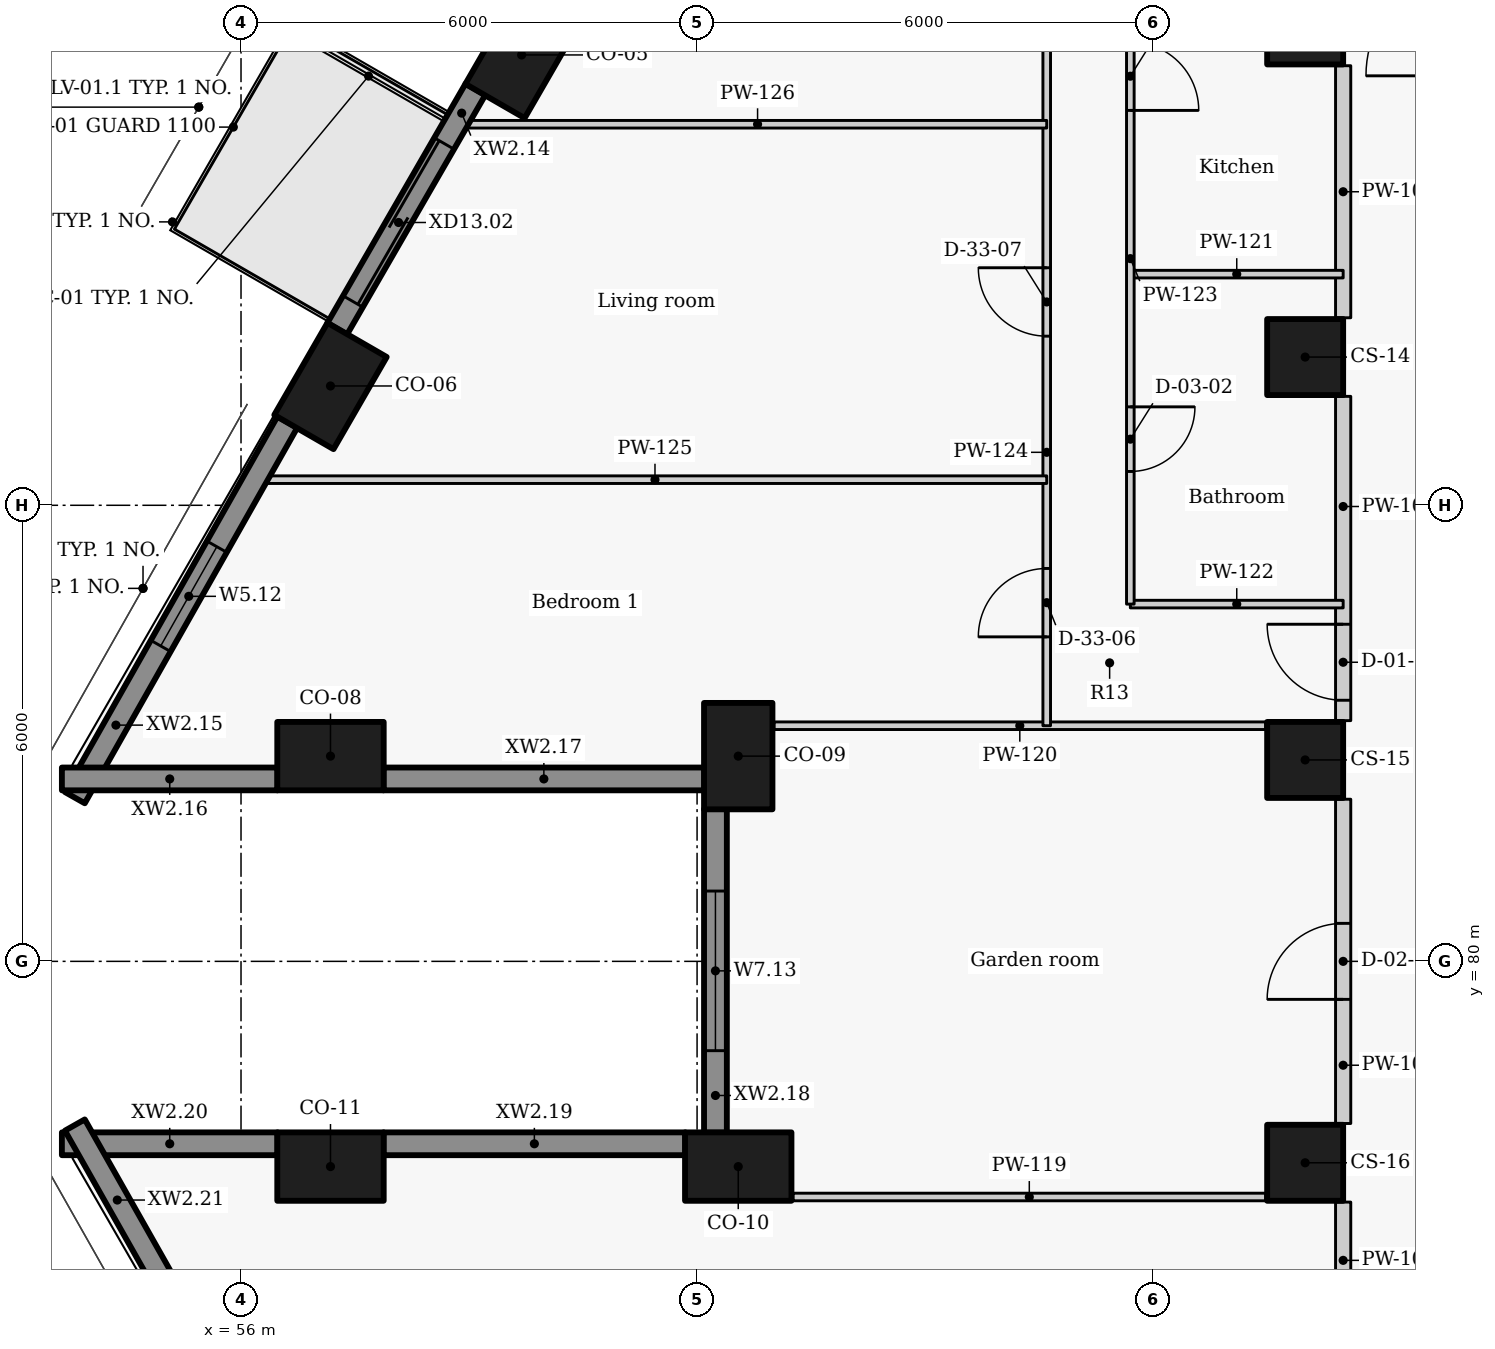
"""IFC4 building model, lengths in metres.
Left out: names, types, materials, properties, quantities, classifications, styles, units other than length and angle.
Written with IfcOpenShell. Run it as: python <this file> out.ifc"""

import sys

from ifc_helpers import new_model, si_unit, direction, frame, frame_2d, origin, origin_2d, place, context, subcontext, project, spatial, rectangle, extrude, element, fill, save


model = new_model("IFC4")
c1 = context("Model", 3, precision=1e-05, world=origin(), true_north=direction((0.0, 1.0)))
c2 = subcontext(c1, "Body", "Model", "MODEL_VIEW")
j1 = project(units=[si_unit("LENGTHUNIT", "METRE"), si_unit("PLANEANGLEUNIT", "RADIAN")], contexts=[c1])
p1 = place(None, origin())
s1 = spatial("IfcSite", under=j1, at=p1, CompositionType="ELEMENT")
p2 = place(p1, origin())
s2 = spatial("IfcBuilding", under=s1, at=p2, CompositionType="ELEMENT")
p3 = place(p2, frame((0.0, 0.0, 117.3)))
s3 = spatial("IfcBuildingStorey", under=s2, at=p3, CompositionType="ELEMENT", Elevation=117.3)
for number, where, z_axis, x_axis in (
    (1, (59.692, 91.925, 0.0), (0.0, 0.0, 1.0), (-0.5, -0.866, 0.0)),
    (2, (57.177, 87.57, 0.0), (0.0, 0.0, 1.0), (-0.5, -0.866, 0.0)),
    (3, (57.177, 82.7, 0.0), (0.0, 0.0, 1.0), (1.0, 0.0, 0.0)),
    (4, (62.542, 82.7, 0.0), (0.0, 0.0, 1.0), (0.0, -1.0, 0.0)),
    (5, (62.542, 77.3, 0.0), (0.0, 0.0, 1.0), (-1.0, 0.0, 0.0)),
    (6, (57.177, 77.3, 0.0), (0.0, 0.0, 1.0), (-1.0, 0.0, 0.0)),
):
    element("IfcColumn", number, at=place(p3, frame(where, z_axis=z_axis, x_axis=x_axis)), inside=s3, PredefinedType="COLUMN", context=c2, shape_type="SweptSolid", body=[
        extrude(rectangle(XDim=1.4, YDim=0.9, at=origin_2d()), origin(), (0.0, 0.0, 1.0), 3.3),
    ])
for number, where, z_axis, x_axis in (
    (7, (70.0, 92.3, 0.0), (0.0, 0.0, 1.0), (0.0, -1.0, 0.0)),
    (8, (70.0, 87.95, 0.0), (0.0, 0.0, 1.0), (0.0, -1.0, 0.0)),
    (9, (70.0, 82.65, 0.0), (0.0, 0.0, 1.0), (0.0, -1.0, 0.0)),
    (10, (70.0, 77.35, 0.0), (0.0, 0.0, 1.0), (0.0, -1.0, 0.0)),
):
    element("IfcColumn", number, at=place(p3, frame(where, z_axis=z_axis, x_axis=x_axis)), inside=s3, PredefinedType="COLUMN", context=c2, shape_type="SweptSolid", body=[
        extrude(rectangle(XDim=1.0, YDim=1.0, at=origin_2d()), origin(), (0.0, 0.0, 1.0), 3.3),
    ])
p4 = place(p3, frame((59.084, 91.472, 0.0), z_axis=(0.0, 0.0, 1.0), x_axis=(-0.500009139881, -0.866020126807, 0.0)))
e11 = element("IfcWall", 11, at=p4, inside=s3, PredefinedType="SOLIDWALL", context=c2, shape_type="SweptSolid", body=[
    extrude(rectangle(XDim=3.637, YDim=0.3, at=frame_2d((1.818, 0.0))), origin(), (0.0, 0.0, 1.0), 2.05),
])
p5 = place(p4, frame((0.823, 0.0, 0.0)))
e12 = element("IfcOpeningElement", 12, at=p5, cuts=e11, PredefinedType="OPENING", context=c2, shape_type="SweptSolid", body=[
    extrude(rectangle(XDim=2.4, YDim=2.0, at=frame_2d((1.2, 1.0))), frame((0.0, 0.16, 0.0), z_axis=(0.0, -1.0, 0.0), x_axis=(1.0, 0.0, 0.0)), (0.0, 0.0, 1.0), 0.32),
])
p6 = place(p3, frame((56.609, 87.094, 0.0), z_axis=(0.0, 0.0, 1.0), x_axis=(-0.492456858874, -0.870336855561, 0.0)))
e13 = element("IfcWall", 13, at=p6, inside=s3, PredefinedType="SOLIDWALL", context=c2, shape_type="SweptSolid", body=[
    extrude(rectangle(XDim=5.677, YDim=0.3, at=frame_2d((2.838, 0.0))), origin(), (0.0, 0.0, 1.0), 2.05),
])
p7 = place(p6, frame((1.883, 0.0, 0.9)))
e14 = element("IfcOpeningElement", 14, at=p7, cuts=e13, PredefinedType="OPENING", context=c2, shape_type="SweptSolid", body=[
    extrude(rectangle(XDim=1.5, YDim=1.1, at=frame_2d((0.75, 0.55))), frame((0.0, 0.16, 0.0), z_axis=(0.0, -1.0, 0.0), x_axis=(1.0, 0.0, 0.0)), (0.0, 0.0, 1.0), 0.32),
])
p8 = place(p3, frame((53.643, 82.4, 0.0), z_axis=(0.0, 0.0, 1.0), x_axis=(1.0, 0.0, 0.0)))
e15 = element("IfcWall", 15, at=p8, inside=s3, PredefinedType="SOLIDWALL", context=c2, shape_type="SweptSolid", body=[
    extrude(rectangle(XDim=2.838, YDim=0.3, at=frame_2d((1.419, 0.0))), origin(), (0.0, 0.0, 1.0), 2.05),
])
p9 = place(p3, frame((57.873, 82.4, 0.0), z_axis=(0.0, 0.0, 1.0), x_axis=(1.0, 0.0, 0.0)))
e16 = element("IfcWall", 16, at=p9, inside=s3, PredefinedType="SOLIDWALL", context=c2, shape_type="SweptSolid", body=[
    extrude(rectangle(XDim=4.223, YDim=0.3, at=frame_2d((2.111, 0.0))), origin(), (0.0, 0.0, 1.0), 2.05),
])
p10 = place(p3, frame((62.242, 82.004, 0.0), z_axis=(0.0, 0.0, 1.0), x_axis=(0.0, -1.0, 0.0)))
e17 = element("IfcWall", 17, at=p10, inside=s3, PredefinedType="SOLIDWALL", context=c2, shape_type="SweptSolid", body=[
    extrude(rectangle(XDim=4.258, YDim=0.3, at=frame_2d((2.129, 0.0))), origin(), (0.0, 0.0, 1.0), 2.05),
])
p11 = place(p10, frame((1.079, 0.0, 0.9)))
e18 = element("IfcOpeningElement", 18, at=p11, cuts=e17, PredefinedType="OPENING", context=c2, shape_type="SweptSolid", body=[
    extrude(rectangle(XDim=2.1, YDim=1.1, at=frame_2d((1.05, 0.55))), frame((0.0, 0.16, 0.0), z_axis=(0.0, -1.0, 0.0), x_axis=(1.0, 0.0, 0.0)), (0.0, 0.0, 1.0), 0.32),
])
p12 = place(p3, frame((61.846, 77.6, 0.0), z_axis=(0.0, 0.0, 1.0), x_axis=(-1.0, 0.0, 0.0)))
e19 = element("IfcWall", 19, at=p12, inside=s3, PredefinedType="SOLIDWALL", context=c2, shape_type="SweptSolid", body=[
    extrude(rectangle(XDim=3.973, YDim=0.3, at=frame_2d((1.986, 0.0))), origin(), (0.0, 0.0, 1.0), 2.05),
])
p13 = place(p3, frame((56.481, 77.6, 0.0), z_axis=(0.0, 0.0, 1.0), x_axis=(-1.0, 0.0, 0.0)))
e20 = element("IfcWall", 20, at=p13, inside=s3, PredefinedType="SOLIDWALL", context=c2, shape_type="SweptSolid", body=[
    extrude(rectangle(XDim=2.838, YDim=0.3, at=frame_2d((1.419, 0.0))), origin(), (0.0, 0.0, 1.0), 2.05),
])
p14 = place(p3, frame((53.814, 77.847, 0.0), z_axis=(0.0, 0.0, 1.0), x_axis=(0.492456858874, -0.870336855561, 0.0)))
e21 = element("IfcWall", 21, at=p14, inside=s3, PredefinedType="SOLIDWALL", context=c2, shape_type="SweptSolid", body=[
    extrude(rectangle(XDim=5.677, YDim=0.3, at=frame_2d((2.838, 0.0))), origin(), (0.0, 0.0, 1.0), 2.05),
])
p15 = place(p14, frame((2.367, 0.0, 0.9)))
e22 = element("IfcOpeningElement", 22, at=p15, cuts=e21, PredefinedType="OPENING", context=c2, shape_type="SweptSolid", body=[
    extrude(rectangle(XDim=2.1, YDim=1.1, at=frame_2d((1.05, 0.55))), frame((0.0, 0.16, 0.0), z_axis=(0.0, -1.0, 0.0), x_axis=(1.0, 0.0, 0.0)), (0.0, 0.0, 1.0), 0.32),
])
p16 = place(p3, frame((70.5, 72.567, 0.0), z_axis=(0.0, 0.0, 1.0), x_axis=(0.0, 1.0, 0.0)))
e23 = element("IfcWall", 23, at=p16, inside=s3, PredefinedType="PARTITIONING", context=c2, shape_type="SweptSolid", body=[
    extrude(rectangle(XDim=4.266, YDim=0.2, at=frame_2d((2.133, 0.0))), origin(), (0.0, 0.0, 1.0), 2.95),
])
p17 = place(p16, frame((1.633, 0.0, 0.0)))
e24 = element("IfcOpeningElement", 24, at=p17, cuts=e23, PredefinedType="OPENING", context=c2, shape_type="SweptSolid", body=[
    extrude(rectangle(XDim=1.0, YDim=2.1, at=frame_2d((0.5, 1.05))), frame((0.0, 0.11, 0.0), z_axis=(0.0, -1.0, 0.0), x_axis=(1.0, 0.0, 0.0)), (0.0, 0.0, 1.0), 0.22),
])
p18 = place(p3, frame((70.5, 77.867, 0.0), z_axis=(0.0, 0.0, 1.0), x_axis=(0.0, 1.0, 0.0)))
e25 = element("IfcWall", 25, at=p18, inside=s3, PredefinedType="PARTITIONING", context=c2, shape_type="SweptSolid", body=[
    extrude(rectangle(XDim=4.266, YDim=0.2, at=frame_2d((2.133, 0.0))), origin(), (0.0, 0.0, 1.0), 2.95),
])
p19 = place(p18, frame((1.633, 0.0, 0.0)))
e26 = element("IfcOpeningElement", 26, at=p19, cuts=e25, PredefinedType="OPENING", context=c2, shape_type="SweptSolid", body=[
    extrude(rectangle(XDim=1.0, YDim=2.1, at=frame_2d((0.5, 1.05))), frame((0.0, 0.11, 0.0), z_axis=(0.0, -1.0, 0.0), x_axis=(1.0, 0.0, 0.0)), (0.0, 0.0, 1.0), 0.22),
])
p20 = place(p3, frame((70.5, 83.167, 0.0), z_axis=(0.0, 0.0, 1.0), x_axis=(0.0, 1.0, 0.0)))
e27 = element("IfcWall", 27, at=p20, inside=s3, PredefinedType="PARTITIONING", context=c2, shape_type="SweptSolid", body=[
    extrude(rectangle(XDim=4.266, YDim=0.2, at=frame_2d((2.133, 0.0))), origin(), (0.0, 0.0, 1.0), 2.95),
])
p21 = place(p20, frame((0.268, 0.0, 0.0)))
e28 = element("IfcOpeningElement", 28, at=p21, cuts=e27, PredefinedType="OPENING", context=c2, shape_type="SweptSolid", body=[
    extrude(rectangle(XDim=1.0, YDim=2.1, at=frame_2d((0.5, 1.05))), frame((0.0, 0.11, 0.0), z_axis=(0.0, -1.0, 0.0), x_axis=(1.0, 0.0, 0.0)), (0.0, 0.0, 1.0), 0.22),
])
p22 = place(p3, frame((70.5, 88.467, 0.0), z_axis=(0.0, 0.0, 1.0), x_axis=(0.0, 1.0, 0.0)))
e29 = element("IfcWall", 29, at=p22, inside=s3, PredefinedType="PARTITIONING", context=c2, shape_type="SweptSolid", body=[
    extrude(rectangle(XDim=3.316, YDim=0.2, at=frame_2d((1.658, 0.0))), origin(), (0.0, 0.0, 1.0), 2.95),
])
p23 = place(p3, frame((63.262, 76.9, 0.0), z_axis=(0.0, 0.0, 1.0), x_axis=(1.0, 0.0, 0.0)))
e30 = element("IfcWall", 30, at=p23, inside=s3, PredefinedType="PARTITIONING", context=c2, shape_type="SweptSolid", body=[
    extrude(rectangle(XDim=6.218, YDim=0.1, at=frame_2d((3.109, 0.0))), origin(), (0.0, 0.0, 1.0), 2.95),
])
p24 = place(p3, frame((63.012, 83.1, 0.0), z_axis=(0.0, 0.0, 1.0), x_axis=(1.0, 0.0, 0.0)))
e31 = element("IfcWall", 31, at=p24, inside=s3, PredefinedType="PARTITIONING", context=c2, shape_type="SweptSolid", body=[
    extrude(rectangle(XDim=6.468, YDim=0.1, at=frame_2d((3.234, 0.0))), origin(), (0.0, 0.0, 1.0), 2.95),
])
for number, where, z_axis, x_axis in (
    (32, (67.7, 89.041, 0.0), (0.0, 0.0, 1.0), (1.0, 0.0, 0.0)),
    (33, (67.7, 84.7, 0.0), (0.0, 0.0, 1.0), (1.0, 0.0, 0.0)),
):
    element("IfcWall", number, at=place(p3, frame(where, z_axis=z_axis, x_axis=x_axis)), inside=s3, PredefinedType="PARTITIONING", context=c2, shape_type="SweptSolid", body=[
        extrude(rectangle(XDim=2.8, YDim=0.1, at=frame_2d((1.4, 0.0))), origin(), (0.0, 0.0, 1.0), 2.43),
    ])
p25 = place(p3, frame((67.7, 94.25, 0.0), z_axis=(0.0, 0.0, 1.0), x_axis=(0.0, -1.0, 0.0)))
e34 = element("IfcWall", 34, at=p25, inside=s3, PredefinedType="PARTITIONING", context=c2, shape_type="SweptSolid", body=[
    extrude(rectangle(XDim=9.55, YDim=0.1, at=frame_2d((4.775, 0.0))), origin(), (0.0, 0.0, 1.0), 2.95),
])
p26 = place(p25, frame((6.955, 0.0, 0.0)))
e35 = element("IfcOpeningElement", 35, at=p26, cuts=e34, PredefinedType="OPENING", context=c2, shape_type="SweptSolid", body=[
    extrude(rectangle(XDim=0.85, YDim=2.1, at=frame_2d((0.425, 1.05))), frame((0.0, 0.06, 0.0), z_axis=(0.0, -1.0, 0.0), x_axis=(1.0, 0.0, 0.0)), (0.0, 0.0, 1.0), 0.12),
])
p27 = place(p25, frame((2.155, 0.0, 0.0)))
e36 = element("IfcOpeningElement", 36, at=p27, cuts=e34, PredefinedType="OPENING", context=c2, shape_type="SweptSolid", body=[
    extrude(rectangle(XDim=0.9, YDim=2.1, at=frame_2d((0.45, 1.05))), frame((0.0, 0.06, 0.0), z_axis=(0.0, -1.0, 0.0), x_axis=(1.0, 0.0, 0.0)), (0.0, 0.0, 1.0), 0.12),
])
p28 = place(p3, frame((66.6, 83.1, 0.0), z_axis=(0.0, 0.0, 1.0), x_axis=(0.0, 1.0, 0.0)))
e37 = element("IfcWall", 37, at=p28, inside=s3, PredefinedType="PARTITIONING", context=c2, shape_type="SweptSolid", body=[
    extrude(rectangle(XDim=11.15, YDim=0.1, at=frame_2d((5.575, 0.0))), origin(), (0.0, 0.0, 1.0), 2.95),
])
p29 = place(p28, frame((1.169, 0.0, 0.0)))
e38 = element("IfcOpeningElement", 38, at=p29, cuts=e37, PredefinedType="OPENING", context=c2, shape_type="SweptSolid", body=[
    extrude(rectangle(XDim=0.9, YDim=2.1, at=frame_2d((0.45, 1.05))), frame((0.0, 0.06, 0.0), z_axis=(0.0, -1.0, 0.0), x_axis=(1.0, 0.0, 0.0)), (0.0, 0.0, 1.0), 0.12),
])
p30 = place(p28, frame((5.125, 0.0, 0.0)))
e39 = element("IfcOpeningElement", 39, at=p30, cuts=e37, PredefinedType="OPENING", context=c2, shape_type="SweptSolid", body=[
    extrude(rectangle(XDim=0.9, YDim=2.1, at=frame_2d((0.45, 1.05))), frame((0.0, 0.06, 0.0), z_axis=(0.0, -1.0, 0.0), x_axis=(1.0, 0.0, 0.0)), (0.0, 0.0, 1.0), 0.12),
])
p31 = place(p28, frame((9.081, 0.0, 0.0)))
e40 = element("IfcOpeningElement", 40, at=p31, cuts=e37, PredefinedType="OPENING", context=c2, shape_type="SweptSolid", body=[
    extrude(rectangle(XDim=0.9, YDim=2.1, at=frame_2d((0.45, 1.05))), frame((0.0, 0.06, 0.0), z_axis=(0.0, -1.0, 0.0), x_axis=(1.0, 0.0, 0.0)), (0.0, 0.0, 1.0), 0.12),
])
p32 = place(p3, frame((56.292, 86.337, 0.0), z_axis=(0.0, 0.0, 1.0), x_axis=(1.0, 0.0, 0.0)))
e41 = element("IfcWall", 41, at=p32, inside=s3, PredefinedType="PARTITIONING", context=c2, shape_type="SweptSolid", body=[
    extrude(rectangle(XDim=10.308, YDim=0.1, at=frame_2d((5.154, 0.0))), origin(), (0.0, 0.0, 1.0), 2.03),
])
p33 = place(p3, frame((58.992, 91.013, 0.0), z_axis=(0.0, 0.0, 1.0), x_axis=(1.0, 0.0, 0.0)))
e42 = element("IfcWall", 42, at=p33, inside=s3, PredefinedType="PARTITIONING", context=c2, shape_type="SweptSolid", body=[
    extrude(rectangle(XDim=7.608, YDim=0.1, at=frame_2d((3.804, 0.0))), origin(), (0.0, 0.0, 1.0), 2.03),
])
p34 = place(p5, origin())
e43 = element("IfcDoor", 43, at=p34, inside=s3, OperationType="DOUBLE_DOOR_SLIDING", PredefinedType="DOOR", context=c2, shape_type="SweptSolid", body=[
    extrude(rectangle(XDim=2.4, YDim=2.0, at=frame_2d((1.2, 1.0))), frame((0.0, 0.025, 0.0), z_axis=(0.0, -1.0, 0.0), x_axis=(1.0, 0.0, 0.0)), (0.0, 0.0, 1.0), 0.05),
])
fill(e12, e43)
p35 = place(p7, origin())
e44 = element("IfcWindow", 44, at=p35, inside=s3, PartitioningType="SINGLE_PANEL", PredefinedType="WINDOW", context=c2, shape_type="SweptSolid", body=[
    extrude(rectangle(XDim=1.5, YDim=1.1, at=frame_2d((0.75, 0.55))), frame((0.0, 0.03, 0.0), z_axis=(0.0, -1.0, 0.0), x_axis=(1.0, 0.0, 0.0)), (0.0, 0.0, 1.0), 0.06),
])
fill(e14, e44)
p36 = place(p11, origin())
e45 = element("IfcWindow", 45, at=p36, inside=s3, PartitioningType="SINGLE_PANEL", PredefinedType="WINDOW", context=c2, shape_type="SweptSolid", body=[
    extrude(rectangle(XDim=2.1, YDim=1.1, at=frame_2d((1.05, 0.55))), frame((0.0, 0.03, 0.0), z_axis=(0.0, -1.0, 0.0), x_axis=(1.0, 0.0, 0.0)), (0.0, 0.0, 1.0), 0.06),
])
fill(e18, e45)
p37 = place(p19, origin())
e46 = element("IfcDoor", 46, at=p37, inside=s3, OperationType="SINGLE_SWING_LEFT", PredefinedType="DOOR", context=c2, shape_type="SweptSolid", body=[
    extrude(rectangle(XDim=1.0, YDim=2.1, at=frame_2d((0.5, 1.05))), frame((0.0, 0.025, 0.0), z_axis=(0.0, -1.0, 0.0), x_axis=(1.0, 0.0, 0.0)), (0.0, 0.0, 1.0), 0.05),
])
fill(e26, e46)
p38 = place(p21, origin())
e47 = element("IfcDoor", 47, at=p38, inside=s3, OperationType="SINGLE_SWING_RIGHT", PredefinedType="DOOR", context=c2, shape_type="SweptSolid", body=[
    extrude(rectangle(XDim=1.0, YDim=2.1, at=frame_2d((0.5, 1.05))), frame((0.0, 0.025, 0.0), z_axis=(0.0, -1.0, 0.0), x_axis=(1.0, 0.0, 0.0)), (0.0, 0.0, 1.0), 0.05),
])
fill(e28, e47)
p39 = place(p26, origin())
e48 = element("IfcDoor", 48, at=p39, inside=s3, OperationType="SINGLE_SWING_LEFT", PredefinedType="DOOR", context=c2, shape_type="SweptSolid", body=[
    extrude(rectangle(XDim=0.85, YDim=2.1, at=frame_2d((0.425, 1.05))), frame((0.0, 0.025, 0.0), z_axis=(0.0, -1.0, 0.0), x_axis=(1.0, 0.0, 0.0)), (0.0, 0.0, 1.0), 0.05),
])
fill(e35, e48)
p40 = place(p27, origin())
e49 = element("IfcDoor", 49, at=p40, inside=s3, OperationType="SINGLE_SWING_RIGHT", PredefinedType="DOOR", context=c2, shape_type="SweptSolid", body=[
    extrude(rectangle(XDim=0.9, YDim=2.1, at=frame_2d((0.45, 1.05))), frame((0.0, 0.025, 0.0), z_axis=(0.0, -1.0, 0.0), x_axis=(1.0, 0.0, 0.0)), (0.0, 0.0, 1.0), 0.05),
])
fill(e36, e49)
p41 = place(p29, origin())
e50 = element("IfcDoor", 50, at=p41, inside=s3, OperationType="SINGLE_SWING_LEFT", PredefinedType="DOOR", context=c2, shape_type="SweptSolid", body=[
    extrude(rectangle(XDim=0.9, YDim=2.1, at=frame_2d((0.45, 1.05))), frame((0.0, 0.025, 0.0), z_axis=(0.0, -1.0, 0.0), x_axis=(1.0, 0.0, 0.0)), (0.0, 0.0, 1.0), 0.05),
])
fill(e38, e50)
p42 = place(p30, origin())
e51 = element("IfcDoor", 51, at=p42, inside=s3, OperationType="SINGLE_SWING_RIGHT", PredefinedType="DOOR", context=c2, shape_type="SweptSolid", body=[
    extrude(rectangle(XDim=0.9, YDim=2.1, at=frame_2d((0.45, 1.05))), frame((0.0, 0.025, 0.0), z_axis=(0.0, -1.0, 0.0), x_axis=(1.0, 0.0, 0.0)), (0.0, 0.0, 1.0), 0.05),
])
fill(e39, e51)
save(model, sys.argv[1])
